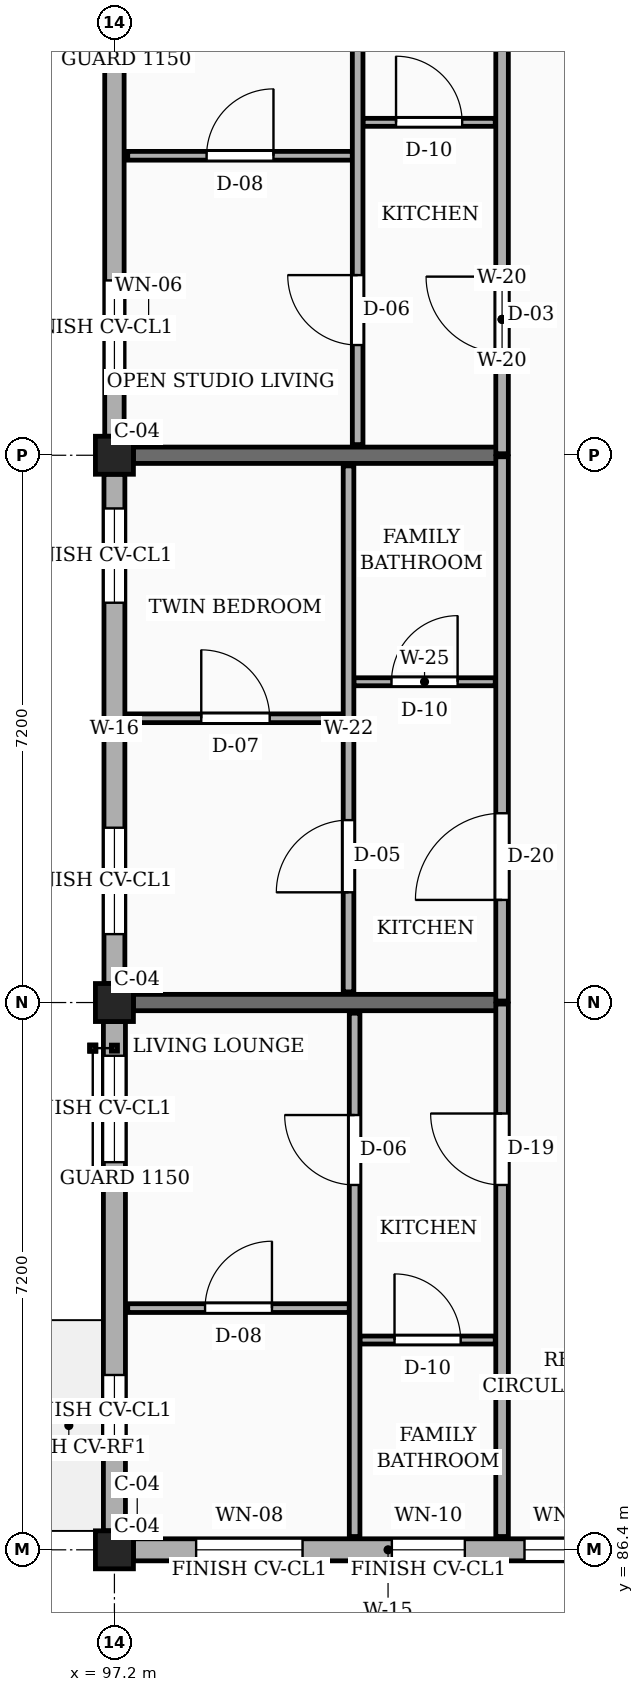
"""IFC4 building model, lengths in metres.
Left out: names, types, materials, properties, quantities, classifications, styles, units other than length and angle.
Written with IfcOpenShell. Run it as: python <this file> out.ifc"""

import sys

from ifc_helpers import new_model, si_unit, direction, frame, frame_2d, origin, origin_2d, place, context, subcontext, project, spatial, rectangle, extrude, element, fill, save


model = new_model("IFC4")
c1 = context("Model", 3, precision=1e-05, world=origin(), true_north=direction((0.0, 1.0)))
c2 = subcontext(c1, "Body", "Model", "MODEL_VIEW")
j1 = project(units=[si_unit("LENGTHUNIT", "METRE"), si_unit("PLANEANGLEUNIT", "RADIAN")], contexts=[c1])
p1 = place(None, origin())
s1 = spatial("IfcSite", under=j1, at=p1, CompositionType="ELEMENT")
p2 = place(p1, origin())
s2 = spatial("IfcBuilding", under=s1, at=p2, CompositionType="ELEMENT")
p3 = place(p2, frame((0.0, 0.0, 32.85)))
s3 = spatial("IfcBuildingStorey", under=s2, at=p3, CompositionType="ELEMENT", Elevation=32.85)
for number, where, z_axis, x_axis in (
    (1, (97.2, 86.4, 0.0), (0.0, 0.0, 1.0), (1.0, 0.0, 0.0)),
    (2, (97.2, 93.6, 0.0), (0.0, 0.0, 1.0), (1.0, 0.0, 0.0)),
    (3, (97.2, 100.8, 0.0), (0.0, 0.0, 1.0), (1.0, 0.0, 0.0)),
):
    element("IfcColumn", number, at=place(p3, frame(where, z_axis=z_axis, x_axis=x_axis)), inside=s3, PredefinedType="COLUMN", context=c2, shape_type="SweptSolid", body=[
        extrude(rectangle(XDim=0.5, YDim=0.5, at=origin_2d()), origin(), (0.0, 0.0, 1.0), 3.15),
    ])
for number, where, z_axis, x_axis in (
    (4, (97.45, 93.6, 0.0), (0.0, 0.0, 1.0), (1.0, 0.0, 0.0)),
    (5, (97.45, 100.8, 0.0), (0.0, 0.0, 1.0), (1.0, 0.0, 0.0)),
):
    element("IfcWall", number, at=place(p3, frame(where, z_axis=z_axis, x_axis=x_axis)), inside=s3, PredefinedType="SOLIDWALL", context=c2, shape_type="SweptSolid", body=[
        extrude(rectangle(XDim=4.85, YDim=0.215, at=frame_2d((2.425, 0.0))), origin(), (0.0, 0.0, 1.0), 2.22),
    ])
p4 = place(p3, frame((97.45, 86.4, 0.0), z_axis=(0.0, 0.0, 1.0), x_axis=(1.0, 0.0, 0.0)))
e6 = element("IfcWall", 6, at=p4, inside=s3, PredefinedType="SOLIDWALL", context=c2, shape_type="SweptSolid", body=[
    extrude(rectangle(XDim=6.7, YDim=0.29, at=frame_2d((3.35, 0.0))), origin(), (0.0, 0.0, 1.0), 2.46),
])
p5 = place(p4, frame((0.825, 0.0, 0.78)))
e7 = element("IfcOpeningElement", 7, at=p5, cuts=e6, PredefinedType="OPENING", context=c2, shape_type="SweptSolid", body=[
    extrude(rectangle(XDim=1.4, YDim=1.15, at=frame_2d((0.7, 0.575))), frame((0.0, 0.155, 0.0), z_axis=(0.0, -1.0, 0.0), x_axis=(1.0, 0.0, 0.0)), (0.0, 0.0, 1.0), 0.31),
])
p6 = place(p4, frame((3.4, 0.0, 0.78)))
e8 = element("IfcOpeningElement", 8, at=p6, cuts=e6, PredefinedType="OPENING", context=c2, shape_type="SweptSolid", body=[
    extrude(rectangle(XDim=0.96, YDim=1.26, at=frame_2d((0.48, 0.63))), frame((0.0, 0.155, 0.0), z_axis=(0.0, -1.0, 0.0), x_axis=(1.0, 0.0, 0.0)), (0.0, 0.0, 1.0), 0.31),
])
p7 = place(p4, frame((5.145, 0.0, 0.78)))
e9 = element("IfcOpeningElement", 9, at=p7, cuts=e6, PredefinedType="OPENING", context=c2, shape_type="SweptSolid", body=[
    extrude(rectangle(XDim=1.12, YDim=1.26, at=frame_2d((0.56, 0.63))), frame((0.0, 0.155, 0.0), z_axis=(0.0, -1.0, 0.0), x_axis=(1.0, 0.0, 0.0)), (0.0, 0.0, 1.0), 0.31),
])
p8 = place(p3, frame((97.2, 107.75, 0.0), z_axis=(0.0, 0.0, 1.0), x_axis=(0.0, -1.0, 0.0)))
e10 = element("IfcWall", 10, at=p8, inside=s3, PredefinedType="SOLIDWALL", context=c2, shape_type="SweptSolid", body=[
    extrude(rectangle(XDim=6.7, YDim=0.255, at=frame_2d((3.35, 0.0))), origin(), (0.0, 0.0, 1.0), 2.46),
])
p9 = place(p8, frame((0.45, 0.0, 0.78)))
e11 = element("IfcOpeningElement", 11, at=p9, cuts=e10, PredefinedType="OPENING", context=c2, shape_type="SweptSolid", body=[
    extrude(rectangle(XDim=1.08, YDim=1.15, at=frame_2d((0.54, 0.575))), frame((0.0, 0.137, 0.0), z_axis=(0.0, -1.0, 0.0), x_axis=(1.0, 0.0, 0.0)), (0.0, 0.0, 1.0), 0.275),
])
p10 = place(p8, frame((4.65, 0.0, 0.78)))
e12 = element("IfcOpeningElement", 12, at=p10, cuts=e10, PredefinedType="OPENING", context=c2, shape_type="SweptSolid", body=[
    extrude(rectangle(XDim=1.24, YDim=1.15, at=frame_2d((0.62, 0.575))), frame((0.0, 0.137, 0.0), z_axis=(0.0, -1.0, 0.0), x_axis=(1.0, 0.0, 0.0)), (0.0, 0.0, 1.0), 0.275),
])
p11 = place(p3, frame((97.2, 100.55, 0.0), z_axis=(0.0, 0.0, 1.0), x_axis=(0.0, -1.0, 0.0)))
e13 = element("IfcWall", 13, at=p11, inside=s3, PredefinedType="SOLIDWALL", context=c2, shape_type="SweptSolid", body=[
    extrude(rectangle(XDim=6.7, YDim=0.275, at=frame_2d((3.35, 0.0))), origin(), (0.0, 0.0, 1.0), 2.46),
])
p12 = place(p11, frame((0.45, 0.0, 0.78)))
e14 = element("IfcOpeningElement", 14, at=p12, cuts=e13, PredefinedType="OPENING", context=c2, shape_type="SweptSolid", body=[
    extrude(rectangle(XDim=1.24, YDim=1.15, at=frame_2d((0.62, 0.575))), frame((0.0, 0.147, 0.0), z_axis=(0.0, -1.0, 0.0), x_axis=(1.0, 0.0, 0.0)), (0.0, 0.0, 1.0), 0.295),
])
p13 = place(p11, frame((4.65, 0.0, 0.78)))
e15 = element("IfcOpeningElement", 15, at=p13, cuts=e13, PredefinedType="OPENING", context=c2, shape_type="SweptSolid", body=[
    extrude(rectangle(XDim=1.4, YDim=1.15, at=frame_2d((0.7, 0.575))), frame((0.0, 0.147, 0.0), z_axis=(0.0, -1.0, 0.0), x_axis=(1.0, 0.0, 0.0)), (0.0, 0.0, 1.0), 0.295),
])
p14 = place(p3, frame((97.2, 93.35, 0.0), z_axis=(0.0, 0.0, 1.0), x_axis=(0.0, -1.0, 0.0)))
e16 = element("IfcWall", 16, at=p14, inside=s3, PredefinedType="SOLIDWALL", context=c2, shape_type="SweptSolid", body=[
    extrude(rectangle(XDim=6.7, YDim=0.29, at=frame_2d((3.35, 0.0))), origin(), (0.0, 0.0, 1.0), 2.46),
])
p15 = place(p14, frame((0.45, 0.0, 0.78)))
e17 = element("IfcOpeningElement", 17, at=p15, cuts=e16, PredefinedType="OPENING", context=c2, shape_type="SweptSolid", body=[
    extrude(rectangle(XDim=1.4, YDim=1.15, at=frame_2d((0.7, 0.575))), frame((0.0, 0.155, 0.0), z_axis=(0.0, -1.0, 0.0), x_axis=(1.0, 0.0, 0.0)), (0.0, 0.0, 1.0), 0.31),
])
p16 = place(p14, frame((4.65, 0.0, 0.78)))
e18 = element("IfcOpeningElement", 18, at=p16, cuts=e16, PredefinedType="OPENING", context=c2, shape_type="SweptSolid", body=[
    extrude(rectangle(XDim=0.96, YDim=1.26, at=frame_2d((0.48, 0.63))), frame((0.0, 0.155, 0.0), z_axis=(0.0, -1.0, 0.0), x_axis=(1.0, 0.0, 0.0)), (0.0, 0.0, 1.0), 0.31),
])
p17 = place(p3, frame((102.3, 86.575, 0.0), z_axis=(0.0, 0.0, 1.0), x_axis=(0.0, 1.0, 0.0)))
e19 = element("IfcWall", 19, at=p17, inside=s3, PredefinedType="PARTITIONING", context=c2, shape_type="SweptSolid", body=[
    extrude(rectangle(XDim=7.005, YDim=0.165, at=frame_2d((3.502, 0.0))), origin(), (0.0, 0.0, 1.0), 2.325),
])
p18 = place(p17, frame((4.625, 0.0, 0.0)))
e20 = element("IfcOpeningElement", 20, at=p18, cuts=e19, PredefinedType="OPENING", context=c2, shape_type="SweptSolid", body=[
    extrude(rectangle(XDim=0.94, YDim=2.12, at=frame_2d((0.47, 1.06))), frame((0.0, 0.093, 0.0), z_axis=(0.0, -1.0, 0.0), x_axis=(1.0, 0.0, 0.0)), (0.0, 0.0, 1.0), 0.185),
])
p19 = place(p3, frame((102.3, 93.62, 0.0), z_axis=(0.0, 0.0, 1.0), x_axis=(0.0, 1.0, 0.0)))
e21 = element("IfcWall", 21, at=p19, inside=s3, PredefinedType="PARTITIONING", context=c2, shape_type="SweptSolid", body=[
    extrude(rectangle(XDim=7.16, YDim=0.165, at=frame_2d((3.58, 0.0))), origin(), (0.0, 0.0, 1.0), 2.325),
])
p20 = place(p19, frame((1.33, 0.0, 0.0)))
e22 = element("IfcOpeningElement", 22, at=p20, cuts=e21, PredefinedType="OPENING", context=c2, shape_type="SweptSolid", body=[
    extrude(rectangle(XDim=1.14, YDim=2.18, at=frame_2d((0.57, 1.09))), frame((0.0, 0.093, 0.0), z_axis=(0.0, -1.0, 0.0), x_axis=(1.0, 0.0, 0.0)), (0.0, 0.0, 1.0), 0.185),
])
p21 = place(p3, frame((102.3, 100.82, 0.0), z_axis=(0.0, 0.0, 1.0), x_axis=(0.0, 1.0, 0.0)))
e23 = element("IfcWall", 23, at=p21, inside=s3, PredefinedType="PARTITIONING", context=c2, shape_type="SweptSolid", body=[
    extrude(rectangle(XDim=7.16, YDim=0.165, at=frame_2d((3.58, 0.0))), origin(), (0.0, 0.0, 1.0), 2.325),
])
p22 = place(p21, frame((1.33, 0.0, 0.0)))
e24 = element("IfcOpeningElement", 24, at=p22, cuts=e23, PredefinedType="OPENING", context=c2, shape_type="SweptSolid", body=[
    extrude(rectangle(XDim=1.0, YDim=2.15, at=frame_2d((0.5, 1.075))), frame((0.0, 0.093, 0.0), z_axis=(0.0, -1.0, 0.0), x_axis=(1.0, 0.0, 0.0)), (0.0, 0.0, 1.0), 0.185),
])
p23 = place(p3, frame((97.375, 89.58, 0.0), z_axis=(0.0, 0.0, 1.0), x_axis=(1.0, 0.0, 0.0)))
e25 = element("IfcWall", 25, at=p23, inside=s3, PredefinedType="PARTITIONING", context=c2, shape_type="SweptSolid", body=[
    extrude(rectangle(XDim=2.915, YDim=0.115, at=frame_2d((1.458, 0.0))), origin(), (0.0, 0.0, 1.0), 2.325),
])
p24 = place(p23, frame((1.018, 0.0, 0.0)))
e26 = element("IfcOpeningElement", 26, at=p24, cuts=e25, PredefinedType="OPENING", context=c2, shape_type="SweptSolid", body=[
    extrude(rectangle(XDim=0.88, YDim=2.08, at=frame_2d((0.44, 1.04))), frame((0.0, 0.067, 0.0), z_axis=(0.0, -1.0, 0.0), x_axis=(1.0, 0.0, 0.0)), (0.0, 0.0, 1.0), 0.135),
])
p25 = place(p3, frame((100.43, 89.16, 0.0), z_axis=(0.0, 0.0, 1.0), x_axis=(1.0, 0.0, 0.0)))
e27 = element("IfcWall", 27, at=p25, inside=s3, PredefinedType="PARTITIONING", context=c2, shape_type="SweptSolid", body=[
    extrude(rectangle(XDim=1.78, YDim=0.105, at=frame_2d((0.89, 0.0))), origin(), (0.0, 0.0, 1.0), 2.325),
])
p26 = place(p25, frame((0.455, 0.0, 0.0)))
e28 = element("IfcOpeningElement", 28, at=p26, cuts=e27, PredefinedType="OPENING", context=c2, shape_type="SweptSolid", body=[
    extrude(rectangle(XDim=0.87, YDim=2.05, at=frame_2d((0.435, 1.025))), frame((0.0, 0.062, 0.0), z_axis=(0.0, -1.0, 0.0), x_axis=(1.0, 0.0, 0.0)), (0.0, 0.0, 1.0), 0.125),
])
p27 = place(p3, frame((100.36, 86.575, 0.0), z_axis=(0.0, 0.0, 1.0), x_axis=(0.0, 1.0, 0.0)))
e29 = element("IfcWall", 29, at=p27, inside=s3, PredefinedType="PARTITIONING", context=c2, shape_type="SweptSolid", body=[
    extrude(rectangle(XDim=6.885, YDim=0.14, at=frame_2d((3.442, 0.0))), origin(), (0.0, 0.0, 1.0), 2.325),
])
p28 = place(p27, frame((4.625, 0.0, 0.0)))
e30 = element("IfcOpeningElement", 30, at=p28, cuts=e29, PredefinedType="OPENING", context=c2, shape_type="SweptSolid", body=[
    extrude(rectangle(XDim=0.92, YDim=2.1, at=frame_2d((0.46, 1.05))), frame((0.0, 0.08, 0.0), z_axis=(0.0, -1.0, 0.0), x_axis=(1.0, 0.0, 0.0)), (0.0, 0.0, 1.0), 0.16),
])
p29 = place(p3, frame((97.375, 97.34, 0.0), z_axis=(0.0, 0.0, 1.0), x_axis=(1.0, 0.0, 0.0)))
e31 = element("IfcWall", 31, at=p29, inside=s3, PredefinedType="PARTITIONING", context=c2, shape_type="SweptSolid", body=[
    extrude(rectangle(XDim=2.835, YDim=0.115, at=frame_2d((1.417, 0.0))), origin(), (0.0, 0.0, 1.0), 2.325),
])
p30 = place(p29, frame((0.968, 0.0, 0.0)))
e32 = element("IfcOpeningElement", 32, at=p30, cuts=e31, PredefinedType="OPENING", context=c2, shape_type="SweptSolid", body=[
    extrude(rectangle(XDim=0.9, YDim=2.1, at=frame_2d((0.45, 1.05))), frame((0.0, 0.067, 0.0), z_axis=(0.0, -1.0, 0.0), x_axis=(1.0, 0.0, 0.0)), (0.0, 0.0, 1.0), 0.135),
])
p31 = place(p3, frame((100.35, 97.82, 0.0), z_axis=(0.0, 0.0, 1.0), x_axis=(1.0, 0.0, 0.0)))
e33 = element("IfcWall", 33, at=p31, inside=s3, PredefinedType="PARTITIONING", context=c2, shape_type="SweptSolid", body=[
    extrude(rectangle(XDim=1.86, YDim=0.105, at=frame_2d((0.93, 0.0))), origin(), (0.0, 0.0, 1.0), 2.325),
])
p32 = place(p31, frame((0.495, 0.0, 0.0)))
e34 = element("IfcOpeningElement", 34, at=p32, cuts=e33, PredefinedType="OPENING", context=c2, shape_type="SweptSolid", body=[
    extrude(rectangle(XDim=0.87, YDim=2.05, at=frame_2d((0.435, 1.025))), frame((0.0, 0.062, 0.0), z_axis=(0.0, -1.0, 0.0), x_axis=(1.0, 0.0, 0.0)), (0.0, 0.0, 1.0), 0.125),
])
p33 = place(p3, frame((100.28, 93.74, 0.0), z_axis=(0.0, 0.0, 1.0), x_axis=(0.0, 1.0, 0.0)))
e35 = element("IfcWall", 35, at=p33, inside=s3, PredefinedType="PARTITIONING", context=c2, shape_type="SweptSolid", body=[
    extrude(rectangle(XDim=6.92, YDim=0.14, at=frame_2d((3.46, 0.0))), origin(), (0.0, 0.0, 1.0), 2.325),
])
p34 = place(p33, frame((1.31, 0.0, 0.0)))
e36 = element("IfcOpeningElement", 36, at=p34, cuts=e35, PredefinedType="OPENING", context=c2, shape_type="SweptSolid", body=[
    extrude(rectangle(XDim=0.95, YDim=2.1, at=frame_2d((0.475, 1.05))), frame((0.0, 0.08, 0.0), z_axis=(0.0, -1.0, 0.0), x_axis=(1.0, 0.0, 0.0)), (0.0, 0.0, 1.0), 0.16),
])
p35 = place(p3, frame((97.375, 104.74, 0.0), z_axis=(0.0, 0.0, 1.0), x_axis=(1.0, 0.0, 0.0)))
e37 = element("IfcWall", 37, at=p35, inside=s3, PredefinedType="PARTITIONING", context=c2, shape_type="SweptSolid", body=[
    extrude(rectangle(XDim=2.955, YDim=0.115, at=frame_2d((1.478, 0.0))), origin(), (0.0, 0.0, 1.0), 2.325),
])
p36 = place(p35, frame((1.038, 0.0, 0.0)))
e38 = element("IfcOpeningElement", 38, at=p36, cuts=e37, PredefinedType="OPENING", context=c2, shape_type="SweptSolid", body=[
    extrude(rectangle(XDim=0.88, YDim=2.08, at=frame_2d((0.44, 1.04))), frame((0.0, 0.067, 0.0), z_axis=(0.0, -1.0, 0.0), x_axis=(1.0, 0.0, 0.0)), (0.0, 0.0, 1.0), 0.135),
])
p37 = place(p3, frame((100.47, 105.18, 0.0), z_axis=(0.0, 0.0, 1.0), x_axis=(1.0, 0.0, 0.0)))
e39 = element("IfcWall", 39, at=p37, inside=s3, PredefinedType="PARTITIONING", context=c2, shape_type="SweptSolid", body=[
    extrude(rectangle(XDim=1.74, YDim=0.105, at=frame_2d((0.87, 0.0))), origin(), (0.0, 0.0, 1.0), 2.325),
])
p38 = place(p37, frame((0.435, 0.0, 0.0)))
e40 = element("IfcOpeningElement", 40, at=p38, cuts=e39, PredefinedType="OPENING", context=c2, shape_type="SweptSolid", body=[
    extrude(rectangle(XDim=0.87, YDim=2.05, at=frame_2d((0.435, 1.025))), frame((0.0, 0.062, 0.0), z_axis=(0.0, -1.0, 0.0), x_axis=(1.0, 0.0, 0.0)), (0.0, 0.0, 1.0), 0.125),
])
p39 = place(p3, frame((100.4, 100.94, 0.0), z_axis=(0.0, 0.0, 1.0), x_axis=(0.0, 1.0, 0.0)))
e41 = element("IfcWall", 41, at=p39, inside=s3, PredefinedType="PARTITIONING", context=c2, shape_type="SweptSolid", body=[
    extrude(rectangle(XDim=6.92, YDim=0.14, at=frame_2d((3.46, 0.0))), origin(), (0.0, 0.0, 1.0), 2.325),
])
p40 = place(p39, frame((1.31, 0.0, 0.0)))
e42 = element("IfcOpeningElement", 42, at=p40, cuts=e41, PredefinedType="OPENING", context=c2, shape_type="SweptSolid", body=[
    extrude(rectangle(XDim=0.92, YDim=2.1, at=frame_2d((0.46, 1.05))), frame((0.0, 0.08, 0.0), z_axis=(0.0, -1.0, 0.0), x_axis=(1.0, 0.0, 0.0)), (0.0, 0.0, 1.0), 0.16),
])
p41 = place(p5, origin())
e43 = element("IfcWindow", 43, at=p41, inside=s3, PartitioningType="SINGLE_PANEL", PredefinedType="WINDOW", context=c2, shape_type="SweptSolid", body=[
    extrude(rectangle(XDim=1.4, YDim=1.15, at=frame_2d((0.7, 0.575))), frame((0.0, 0.03, 0.0), z_axis=(0.0, -1.0, 0.0), x_axis=(1.0, 0.0, 0.0)), (0.0, 0.0, 1.0), 0.06),
])
fill(e7, e43)
p42 = place(p6, origin())
e44 = element("IfcWindow", 44, at=p42, inside=s3, PartitioningType="SINGLE_PANEL", PredefinedType="WINDOW", context=c2, shape_type="SweptSolid", body=[
    extrude(rectangle(XDim=0.96, YDim=1.26, at=frame_2d((0.48, 0.63))), frame((0.0, 0.03, 0.0), z_axis=(0.0, -1.0, 0.0), x_axis=(1.0, 0.0, 0.0)), (0.0, 0.0, 1.0), 0.06),
])
fill(e8, e44)
p43 = place(p7, origin())
e45 = element("IfcWindow", 45, at=p43, inside=s3, PartitioningType="SINGLE_PANEL", PredefinedType="WINDOW", context=c2, shape_type="SweptSolid", body=[
    extrude(rectangle(XDim=1.12, YDim=1.26, at=frame_2d((0.56, 0.63))), frame((0.0, 0.03, 0.0), z_axis=(0.0, -1.0, 0.0), x_axis=(1.0, 0.0, 0.0)), (0.0, 0.0, 1.0), 0.06),
])
fill(e9, e45)
p44 = place(p10, origin())
e46 = element("IfcWindow", 46, at=p44, inside=s3, PartitioningType="SINGLE_PANEL", PredefinedType="WINDOW", context=c2, shape_type="SweptSolid", body=[
    extrude(rectangle(XDim=1.24, YDim=1.15, at=frame_2d((0.62, 0.575))), frame((0.0, 0.03, 0.0), z_axis=(0.0, -1.0, 0.0), x_axis=(1.0, 0.0, 0.0)), (0.0, 0.0, 1.0), 0.06),
])
fill(e12, e46)
p45 = place(p12, origin())
e47 = element("IfcWindow", 47, at=p45, inside=s3, PartitioningType="SINGLE_PANEL", PredefinedType="WINDOW", context=c2, shape_type="SweptSolid", body=[
    extrude(rectangle(XDim=1.24, YDim=1.15, at=frame_2d((0.62, 0.575))), frame((0.0, 0.03, 0.0), z_axis=(0.0, -1.0, 0.0), x_axis=(1.0, 0.0, 0.0)), (0.0, 0.0, 1.0), 0.06),
])
fill(e14, e47)
p46 = place(p13, origin())
e48 = element("IfcWindow", 48, at=p46, inside=s3, PartitioningType="SINGLE_PANEL", PredefinedType="WINDOW", context=c2, shape_type="SweptSolid", body=[
    extrude(rectangle(XDim=1.4, YDim=1.15, at=frame_2d((0.7, 0.575))), frame((0.0, 0.03, 0.0), z_axis=(0.0, -1.0, 0.0), x_axis=(1.0, 0.0, 0.0)), (0.0, 0.0, 1.0), 0.06),
])
fill(e15, e48)
p47 = place(p15, origin())
e49 = element("IfcWindow", 49, at=p47, inside=s3, PartitioningType="SINGLE_PANEL", PredefinedType="WINDOW", context=c2, shape_type="SweptSolid", body=[
    extrude(rectangle(XDim=1.4, YDim=1.15, at=frame_2d((0.7, 0.575))), frame((0.0, 0.03, 0.0), z_axis=(0.0, -1.0, 0.0), x_axis=(1.0, 0.0, 0.0)), (0.0, 0.0, 1.0), 0.06),
])
fill(e17, e49)
p48 = place(p16, origin())
e50 = element("IfcWindow", 50, at=p48, inside=s3, PartitioningType="SINGLE_PANEL", PredefinedType="WINDOW", context=c2, shape_type="SweptSolid", body=[
    extrude(rectangle(XDim=0.96, YDim=1.26, at=frame_2d((0.48, 0.63))), frame((0.0, 0.03, 0.0), z_axis=(0.0, -1.0, 0.0), x_axis=(1.0, 0.0, 0.0)), (0.0, 0.0, 1.0), 0.06),
])
fill(e18, e50)
p49 = place(p18, origin())
e51 = element("IfcDoor", 51, at=p49, inside=s3, OperationType="SINGLE_SWING_RIGHT", PredefinedType="DOOR", context=c2, shape_type="SweptSolid", body=[
    extrude(rectangle(XDim=0.94, YDim=2.12, at=frame_2d((0.47, 1.06))), frame((0.0, 0.025, 0.0), z_axis=(0.0, -1.0, 0.0), x_axis=(1.0, 0.0, 0.0)), (0.0, 0.0, 1.0), 0.05),
])
fill(e20, e51)
p50 = place(p20, origin())
e52 = element("IfcDoor", 52, at=p50, inside=s3, OperationType="SINGLE_SWING_LEFT", PredefinedType="DOOR", context=c2, shape_type="SweptSolid", body=[
    extrude(rectangle(XDim=1.14, YDim=2.18, at=frame_2d((0.57, 1.09))), frame((0.0, 0.025, 0.0), z_axis=(0.0, -1.0, 0.0), x_axis=(1.0, 0.0, 0.0)), (0.0, 0.0, 1.0), 0.05),
])
fill(e22, e52)
p51 = place(p22, origin())
e53 = element("IfcDoor", 53, at=p51, inside=s3, OperationType="SINGLE_SWING_RIGHT", PredefinedType="DOOR", context=c2, shape_type="SweptSolid", body=[
    extrude(rectangle(XDim=1.0, YDim=2.15, at=frame_2d((0.5, 1.075))), frame((0.0, 0.025, 0.0), z_axis=(0.0, -1.0, 0.0), x_axis=(1.0, 0.0, 0.0)), (0.0, 0.0, 1.0), 0.05),
])
fill(e24, e53)
p52 = place(p24, origin())
e54 = element("IfcDoor", 54, at=p52, inside=s3, OperationType="SINGLE_SWING_RIGHT", PredefinedType="DOOR", context=c2, shape_type="SweptSolid", body=[
    extrude(rectangle(XDim=0.88, YDim=2.08, at=frame_2d((0.44, 1.04))), frame((0.0, 0.025, 0.0), z_axis=(0.0, -1.0, 0.0), x_axis=(1.0, 0.0, 0.0)), (0.0, 0.0, 1.0), 0.05),
])
fill(e26, e54)
p53 = place(p26, origin())
e55 = element("IfcDoor", 55, at=p53, inside=s3, OperationType="SINGLE_SWING_LEFT", PredefinedType="DOOR", context=c2, shape_type="SweptSolid", body=[
    extrude(rectangle(XDim=0.87, YDim=2.05, at=frame_2d((0.435, 1.025))), frame((0.0, 0.025, 0.0), z_axis=(0.0, -1.0, 0.0), x_axis=(1.0, 0.0, 0.0)), (0.0, 0.0, 1.0), 0.05),
])
fill(e28, e55)
p54 = place(p28, origin())
e56 = element("IfcDoor", 56, at=p54, inside=s3, OperationType="SINGLE_SWING_RIGHT", PredefinedType="DOOR", context=c2, shape_type="SweptSolid", body=[
    extrude(rectangle(XDim=0.92, YDim=2.1, at=frame_2d((0.46, 1.05))), frame((0.0, 0.025, 0.0), z_axis=(0.0, -1.0, 0.0), x_axis=(1.0, 0.0, 0.0)), (0.0, 0.0, 1.0), 0.05),
])
fill(e30, e56)
p55 = place(p30, origin())
e57 = element("IfcDoor", 57, at=p55, inside=s3, OperationType="SINGLE_SWING_LEFT", PredefinedType="DOOR", context=c2, shape_type="SweptSolid", body=[
    extrude(rectangle(XDim=0.9, YDim=2.1, at=frame_2d((0.45, 1.05))), frame((0.0, 0.025, 0.0), z_axis=(0.0, -1.0, 0.0), x_axis=(1.0, 0.0, 0.0)), (0.0, 0.0, 1.0), 0.05),
])
fill(e32, e57)
p56 = place(p32, origin())
e58 = element("IfcDoor", 58, at=p56, inside=s3, OperationType="SINGLE_SWING_RIGHT", PredefinedType="DOOR", context=c2, shape_type="SweptSolid", body=[
    extrude(rectangle(XDim=0.87, YDim=2.05, at=frame_2d((0.435, 1.025))), frame((0.0, 0.025, 0.0), z_axis=(0.0, -1.0, 0.0), x_axis=(1.0, 0.0, 0.0)), (0.0, 0.0, 1.0), 0.05),
])
fill(e34, e58)
p57 = place(p34, origin())
e59 = element("IfcDoor", 59, at=p57, inside=s3, OperationType="SINGLE_SWING_LEFT", PredefinedType="DOOR", context=c2, shape_type="SweptSolid", body=[
    extrude(rectangle(XDim=0.95, YDim=2.1, at=frame_2d((0.475, 1.05))), frame((0.0, 0.025, 0.0), z_axis=(0.0, -1.0, 0.0), x_axis=(1.0, 0.0, 0.0)), (0.0, 0.0, 1.0), 0.05),
])
fill(e36, e59)
p58 = place(p36, origin())
e60 = element("IfcDoor", 60, at=p58, inside=s3, OperationType="SINGLE_SWING_RIGHT", PredefinedType="DOOR", context=c2, shape_type="SweptSolid", body=[
    extrude(rectangle(XDim=0.88, YDim=2.08, at=frame_2d((0.44, 1.04))), frame((0.0, 0.025, 0.0), z_axis=(0.0, -1.0, 0.0), x_axis=(1.0, 0.0, 0.0)), (0.0, 0.0, 1.0), 0.05),
])
fill(e38, e60)
p59 = place(p38, origin())
e61 = element("IfcDoor", 61, at=p59, inside=s3, OperationType="SINGLE_SWING_LEFT", PredefinedType="DOOR", context=c2, shape_type="SweptSolid", body=[
    extrude(rectangle(XDim=0.87, YDim=2.05, at=frame_2d((0.435, 1.025))), frame((0.0, 0.025, 0.0), z_axis=(0.0, -1.0, 0.0), x_axis=(1.0, 0.0, 0.0)), (0.0, 0.0, 1.0), 0.05),
])
fill(e40, e61)
p60 = place(p40, origin())
e62 = element("IfcDoor", 62, at=p60, inside=s3, OperationType="SINGLE_SWING_RIGHT", PredefinedType="DOOR", context=c2, shape_type="SweptSolid", body=[
    extrude(rectangle(XDim=0.92, YDim=2.1, at=frame_2d((0.46, 1.05))), frame((0.0, 0.025, 0.0), z_axis=(0.0, -1.0, 0.0), x_axis=(1.0, 0.0, 0.0)), (0.0, 0.0, 1.0), 0.05),
])
fill(e42, e62)
save(model, sys.argv[1])
